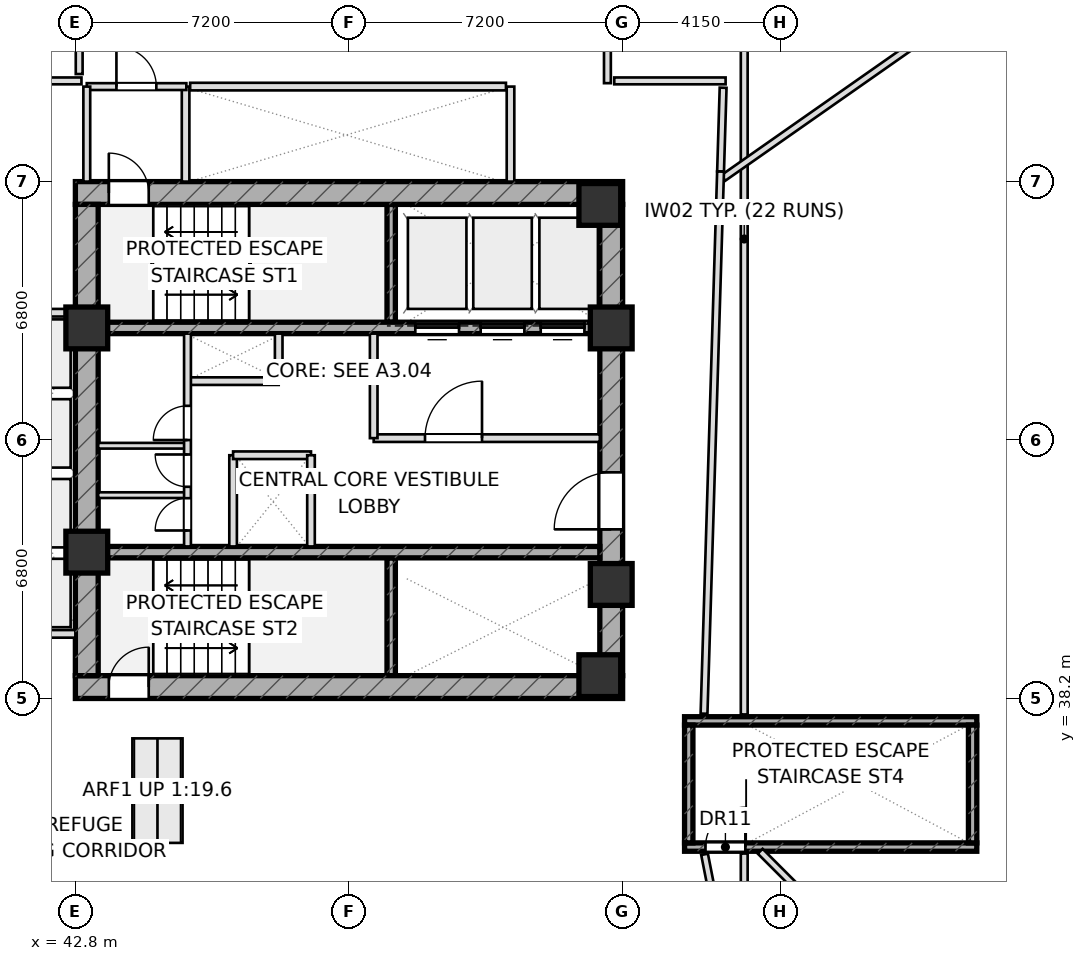
"""IFC4 building model, lengths in metres.
Left out: names, types, materials, properties, quantities, classifications, styles, units other than length and angle.
Written with IfcOpenShell. Run it as: python <this file> out.ifc"""

import sys

from ifc_helpers import new_model, si_unit, direction, frame, frame_2d, origin, origin_2d, place, context, subcontext, project, spatial, rectangle, extrude, element, fill, save


model = new_model("IFC4")
c1 = context("Model", 3, precision=1e-05, world=origin(), true_north=direction((0.0, 1.0)))
c2 = subcontext(c1, "Body", "Model", "MODEL_VIEW")
j1 = project(units=[si_unit("LENGTHUNIT", "METRE"), si_unit("PLANEANGLEUNIT", "RADIAN")], contexts=[c1])
p1 = place(None, origin())
s1 = spatial("IfcSite", under=j1, at=p1, CompositionType="ELEMENT")
p2 = place(p1, origin())
s2 = spatial("IfcBuilding", under=s1, at=p2, CompositionType="ELEMENT")
p3 = place(p2, frame((0.0, 0.0, 22.2)))
s3 = spatial("IfcBuildingStorey", under=s2, at=p3, CompositionType="ELEMENT", Elevation=22.2)
for number, where, z_axis, x_axis in (
    (1, (51.11, 48.1, 0.0), (0.0, 0.0, 1.0), (0.0, 1.0, 0.0)),
    (2, (51.11, 38.8, 0.0), (0.0, 0.0, 1.0), (0.0, 1.0, 0.0)),
):
    element("IfcWall", number, at=place(p3, frame(where, z_axis=z_axis, x_axis=x_axis)), inside=s3, PredefinedType="SHEAR", context=c2, shape_type="SweptSolid", body=[
        extrude(rectangle(XDim=3.1, YDim=0.22, at=frame_2d((1.55, 0.0))), origin(), (0.0, 0.0, 1.0), 5.1),
    ])
p4 = place(p3, frame((58.83, 34.29, 0.0), z_axis=(0.0, 0.0, 1.0), x_axis=(1.0, 0.0, 0.0)))
e3 = element("IfcWall", 3, at=p4, inside=s3, PredefinedType="SHEAR", context=c2, shape_type="SweptSolid", body=[
    extrude(rectangle(XDim=7.69, YDim=0.22, at=frame_2d((3.845, 0.0))), origin(), (0.0, 0.0, 1.0), 5.1),
])
p5 = place(p4, frame((0.55, 0.0, 0.0)))
e4 = element("IfcOpeningElement", 4, at=p5, cuts=e3, PredefinedType="OPENING", context=c2, shape_type="SweptSolid", body=[
    extrude(rectangle(XDim=1.05, YDim=2.2, at=frame_2d((0.525, 1.1))), frame((0.0, 0.12, 0.0), z_axis=(0.0, -1.0, 0.0), x_axis=(1.0, 0.0, 0.0)), (0.0, 0.0, 1.0), 0.24),
])
p6 = place(p3, frame((58.83, 37.61, 0.0), z_axis=(0.0, 0.0, 1.0), x_axis=(1.0, 0.0, 0.0)))
e5 = element("IfcWall", 5, at=p6, inside=s3, PredefinedType="SHEAR", context=c2, shape_type="SweptSolid", body=[
    extrude(rectangle(XDim=7.69, YDim=0.22, at=frame_2d((3.845, 0.0))), origin(), (0.0, 0.0, 1.0), 5.1),
])
for number, where, z_axis, x_axis in (
    (6, (66.41, 34.4, 0.0), (0.0, 0.0, 1.0), (0.0, 1.0, 0.0)),
    (7, (58.94, 34.4, 0.0), (0.0, 0.0, 1.0), (0.0, 1.0, 0.0)),
):
    element("IfcWall", number, at=place(p3, frame(where, z_axis=z_axis, x_axis=x_axis)), inside=s3, PredefinedType="SHEAR", context=c2, shape_type="SweptSolid", body=[
        extrude(rectangle(XDim=3.1, YDim=0.22, at=frame_2d((1.55, 0.0))), origin(), (0.0, 0.0, 1.0), 5.1),
    ])
p7 = place(p3, frame((42.8, 51.5, 0.0), z_axis=(0.0, 0.0, 1.0), x_axis=(1.0, 0.0, 0.0)))
e8 = element("IfcWall", 8, at=p7, inside=s3, PredefinedType="SHEAR", context=c2, shape_type="SweptSolid", body=[
    extrude(rectangle(XDim=14.4, YDim=0.6, at=frame_2d((7.2, 0.0))), origin(), (0.0, 0.0, 1.0), 5.1),
])
p8 = place(p7, frame((0.88, 0.0, 0.0)))
e9 = element("IfcOpeningElement", 9, at=p8, cuts=e8, PredefinedType="OPENING", context=c2, shape_type="SweptSolid", body=[
    extrude(rectangle(XDim=1.05, YDim=2.2, at=frame_2d((0.525, 1.1))), frame((0.0, 0.31, 0.0), z_axis=(0.0, -1.0, 0.0), x_axis=(1.0, 0.0, 0.0)), (0.0, 0.0, 1.0), 0.62),
])
p9 = place(p3, frame((42.8, 38.5, 0.0), z_axis=(0.0, 0.0, 1.0), x_axis=(1.0, 0.0, 0.0)))
e10 = element("IfcWall", 10, at=p9, inside=s3, PredefinedType="SHEAR", context=c2, shape_type="SweptSolid", body=[
    extrude(rectangle(XDim=14.4, YDim=0.6, at=frame_2d((7.2, 0.0))), origin(), (0.0, 0.0, 1.0), 5.1),
])
p10 = place(p9, frame((0.88, 0.0, 0.0)))
e11 = element("IfcOpeningElement", 11, at=p10, cuts=e10, PredefinedType="OPENING", context=c2, shape_type="SweptSolid", body=[
    extrude(rectangle(XDim=1.05, YDim=2.2, at=frame_2d((0.525, 1.1))), frame((0.0, 0.31, 0.0), z_axis=(0.0, -1.0, 0.0), x_axis=(1.0, 0.0, 0.0)), (0.0, 0.0, 1.0), 0.62),
])
p11 = place(p3, frame((43.1, 38.8, 0.0), z_axis=(0.0, 0.0, 1.0), x_axis=(0.0, 1.0, 0.0)))
e12 = element("IfcWall", 12, at=p11, inside=s3, PredefinedType="SHEAR", context=c2, shape_type="SweptSolid", body=[
    extrude(rectangle(XDim=12.4, YDim=0.6, at=frame_2d((6.2, 0.0))), origin(), (0.0, 0.0, 1.0), 5.1),
])
p12 = place(p3, frame((56.9, 38.8, 0.0), z_axis=(0.0, 0.0, 1.0), x_axis=(0.0, 1.0, 0.0)))
e13 = element("IfcWall", 13, at=p12, inside=s3, PredefinedType="SHEAR", context=c2, shape_type="SweptSolid", body=[
    extrude(rectangle(XDim=12.4, YDim=0.6, at=frame_2d((6.2, 0.0))), origin(), (0.0, 0.0, 1.0), 5.1),
])
p13 = place(p12, frame((3.85, 0.0, 0.0)))
e14 = element("IfcOpeningElement", 14, at=p13, cuts=e13, PredefinedType="OPENING", context=c2, shape_type="SweptSolid", body=[
    extrude(rectangle(XDim=1.5, YDim=2.2, at=frame_2d((0.75, 1.1))), frame((0.0, 0.31, 0.0), z_axis=(0.0, -1.0, 0.0), x_axis=(1.0, 0.0, 0.0)), (0.0, 0.0, 1.0), 0.62),
])
p14 = place(p3, frame((43.4, 47.95, 0.0), z_axis=(0.0, 0.0, 1.0), x_axis=(1.0, 0.0, 0.0)))
e15 = element("IfcWall", 15, at=p14, inside=s3, PredefinedType="SHEAR", context=c2, shape_type="SweptSolid", body=[
    extrude(rectangle(XDim=13.2, YDim=0.3, at=frame_2d((6.6, 0.0))), origin(), (0.0, 0.0, 1.0), 5.1),
])
p15 = place(p14, frame((8.345, 0.0, 0.0)))
e16 = element("IfcOpeningElement", 16, at=p15, cuts=e15, PredefinedType="OPENING", context=c2, shape_type="SweptSolid", body=[
    extrude(rectangle(XDim=1.15, YDim=2.2, at=frame_2d((0.575, 1.1))), frame((0.0, 0.16, 0.0), z_axis=(0.0, -1.0, 0.0), x_axis=(1.0, 0.0, 0.0)), (0.0, 0.0, 1.0), 0.32),
])
p16 = place(p14, frame((10.065, 0.0, 0.0)))
e17 = element("IfcOpeningElement", 17, at=p16, cuts=e15, PredefinedType="OPENING", context=c2, shape_type="SweptSolid", body=[
    extrude(rectangle(XDim=1.15, YDim=2.2, at=frame_2d((0.575, 1.1))), frame((0.0, 0.16, 0.0), z_axis=(0.0, -1.0, 0.0), x_axis=(1.0, 0.0, 0.0)), (0.0, 0.0, 1.0), 0.32),
])
p17 = place(p14, frame((11.645, 0.0, 0.0)))
e18 = element("IfcOpeningElement", 18, at=p17, cuts=e15, PredefinedType="OPENING", context=c2, shape_type="SweptSolid", body=[
    extrude(rectangle(XDim=1.15, YDim=2.2, at=frame_2d((0.575, 1.1))), frame((0.0, 0.16, 0.0), z_axis=(0.0, -1.0, 0.0), x_axis=(1.0, 0.0, 0.0)), (0.0, 0.0, 1.0), 0.32),
])
p18 = place(p3, frame((43.4, 42.05, 0.0), z_axis=(0.0, 0.0, 1.0), x_axis=(1.0, 0.0, 0.0)))
e19 = element("IfcWall", 19, at=p18, inside=s3, PredefinedType="SHEAR", context=c2, shape_type="SweptSolid", body=[
    extrude(rectangle(XDim=13.2, YDim=0.3, at=frame_2d((6.6, 0.0))), origin(), (0.0, 0.0, 1.0), 5.1),
])
for number, where, z_axis, x_axis in (
    (20, (43.1, 47.95, 0.0), (0.0, 0.0, 1.0), (1.0, 0.0, 0.0)),
    (21, (56.9, 47.95, 0.0), (0.0, 0.0, 1.0), (1.0, 0.0, 0.0)),
    (22, (56.6, 51.2, 0.0), (0.0, 0.0, 1.0), (1.0, 0.0, 0.0)),
    (23, (43.1, 42.05, 0.0), (0.0, 0.0, 1.0), (1.0, 0.0, 0.0)),
    (24, (56.9, 41.2, 0.0), (0.0, 0.0, 1.0), (1.0, 0.0, 0.0)),
    (25, (56.6, 38.8, 0.0), (0.0, 0.0, 1.0), (1.0, 0.0, 0.0)),
):
    element("IfcColumn", number, at=place(p3, frame(where, z_axis=z_axis, x_axis=x_axis)), inside=s3, PredefinedType="COLUMN", context=c2, shape_type="SweptSolid", body=[
        extrude(rectangle(XDim=1.1, YDim=1.1, at=origin_2d()), origin(), (0.0, 0.0, 1.0), 5.1),
    ])
for number, where, z_axis, x_axis in (
    (26, (40.3, 39.9, 0.0), (0.0, 0.0, 1.0), (1.0, 0.0, 0.0)),
    (27, (40.3, 48.35, 0.0), (0.0, 0.0, 1.0), (1.0, 0.0, 0.0)),
    (28, (45.7, 51.8, 0.0), (0.0, 0.0, 1.0), (0.0, 1.0, 0.0)),
    (29, (54.25, 51.8, 0.0), (0.0, 0.0, 1.0), (0.0, 1.0, 0.0)),
):
    element("IfcWall", number, at=place(p3, frame(where, z_axis=z_axis, x_axis=x_axis)), inside=s3, PredefinedType="PARTITIONING", context=c2, shape_type="SweptSolid", body=[
        extrude(rectangle(XDim=2.5, YDim=0.2, at=frame_2d((1.25, 0.0))), origin(), (0.0, 0.0, 1.0), 5.1),
    ])
p19 = place(p3, frame((45.75, 46.55, 0.0), z_axis=(0.0, 0.0, 1.0), x_axis=(1.0, 0.0, 0.0)))
e30 = element("IfcWall", 30, at=p19, inside=s3, PredefinedType="PARTITIONING", context=c2, shape_type="SweptSolid", body=[
    extrude(rectangle(XDim=2.4, YDim=0.2, at=frame_2d((1.2, 0.0))), origin(), (0.0, 0.0, 1.0), 5.1),
])
p20 = place(p3, frame((48.15, 46.55, 0.0), z_axis=(0.0, 0.0, 1.0), x_axis=(0.0, 1.0, 0.0)))
e31 = element("IfcWall", 31, at=p20, inside=s3, PredefinedType="PARTITIONING", context=c2, shape_type="SweptSolid", body=[
    extrude(rectangle(XDim=1.25, YDim=0.2, at=frame_2d((0.625, 0.0))), origin(), (0.0, 0.0, 1.0), 5.1),
])
p21 = place(p3, frame((46.95, 42.2, 0.0), z_axis=(0.0, 0.0, 1.0), x_axis=(0.0, 1.0, 0.0)))
e32 = element("IfcWall", 32, at=p21, inside=s3, PredefinedType="PARTITIONING", context=c2, shape_type="SweptSolid", body=[
    extrude(rectangle(XDim=2.4, YDim=0.2, at=frame_2d((1.2, 0.0))), origin(), (0.0, 0.0, 1.0), 5.1),
])
p22 = place(p3, frame((46.95, 44.6, 0.0), z_axis=(0.0, 0.0, 1.0), x_axis=(1.0, 0.0, 0.0)))
e33 = element("IfcWall", 33, at=p22, inside=s3, PredefinedType="PARTITIONING", context=c2, shape_type="SweptSolid", body=[
    extrude(rectangle(XDim=2.05, YDim=0.2, at=frame_2d((1.025, 0.0))), origin(), (0.0, 0.0, 1.0), 5.1),
])
p23 = place(p3, frame((50.65, 45.05, 0.0), z_axis=(0.0, 0.0, 1.0), x_axis=(1.0, 0.0, 0.0)))
e34 = element("IfcWall", 34, at=p23, inside=s3, PredefinedType="PARTITIONING", context=c2, shape_type="SweptSolid", body=[
    extrude(rectangle(XDim=5.95, YDim=0.2, at=frame_2d((2.975, 0.0))), origin(), (0.0, 0.0, 1.0), 5.1),
])
p24 = place(p23, frame((1.35, 0.0, 0.0)))
e35 = element("IfcOpeningElement", 35, at=p24, cuts=e34, PredefinedType="OPENING", context=c2, shape_type="SweptSolid", body=[
    extrude(rectangle(XDim=1.5, YDim=2.2, at=frame_2d((0.75, 1.1))), frame((0.0, 0.11, 0.0), z_axis=(0.0, -1.0, 0.0), x_axis=(1.0, 0.0, 0.0)), (0.0, 0.0, 1.0), 0.22),
])
p25 = place(p3, frame((50.65, 45.05, 0.0), z_axis=(0.0, 0.0, 1.0), x_axis=(0.0, 1.0, 0.0)))
e36 = element("IfcWall", 36, at=p25, inside=s3, PredefinedType="PARTITIONING", context=c2, shape_type="SweptSolid", body=[
    extrude(rectangle(XDim=2.75, YDim=0.2, at=frame_2d((1.375, 0.0))), origin(), (0.0, 0.0, 1.0), 5.1),
])
for number, where, z_axis, x_axis in (
    (37, (43.4, 43.55, 0.0), (0.0, 0.0, 1.0), (1.0, 0.0, 0.0)),
    (38, (43.4, 44.85, 0.0), (0.0, 0.0, 1.0), (1.0, 0.0, 0.0)),
):
    element("IfcWall", number, at=place(p3, frame(where, z_axis=z_axis, x_axis=x_axis)), inside=s3, PredefinedType="PARTITIONING", context=c2, shape_type="SweptSolid", body=[
        extrude(rectangle(XDim=2.35, YDim=0.15, at=frame_2d((1.175, 0.0))), origin(), (0.0, 0.0, 1.0), 5.1),
    ])
p26 = place(p3, frame((45.75, 42.2, 0.0), z_axis=(0.0, 0.0, 1.0), x_axis=(0.0, 1.0, 0.0)))
e39 = element("IfcWall", 39, at=p26, inside=s3, PredefinedType="PARTITIONING", context=c2, shape_type="SweptSolid", body=[
    extrude(rectangle(XDim=5.6, YDim=0.18, at=frame_2d((2.8, 0.0))), origin(), (0.0, 0.0, 1.0), 5.1),
])
p27 = place(p26, frame((0.42, 0.0, 0.0)))
e40 = element("IfcOpeningElement", 40, at=p27, cuts=e39, PredefinedType="OPENING", context=c2, shape_type="SweptSolid", body=[
    extrude(rectangle(XDim=0.85, YDim=2.05, at=frame_2d((0.425, 1.025))), frame((0.0, 0.1, 0.0), z_axis=(0.0, -1.0, 0.0), x_axis=(1.0, 0.0, 0.0)), (0.0, 0.0, 1.0), 0.2),
])
p28 = place(p26, frame((1.57, 0.0, 0.0)))
e41 = element("IfcOpeningElement", 41, at=p28, cuts=e39, PredefinedType="OPENING", context=c2, shape_type="SweptSolid", body=[
    extrude(rectangle(XDim=0.85, YDim=2.05, at=frame_2d((0.425, 1.025))), frame((0.0, 0.1, 0.0), z_axis=(0.0, -1.0, 0.0), x_axis=(1.0, 0.0, 0.0)), (0.0, 0.0, 1.0), 0.2),
])
p29 = place(p26, frame((2.8, 0.0, 0.0)))
e42 = element("IfcOpeningElement", 42, at=p29, cuts=e39, PredefinedType="OPENING", context=c2, shape_type="SweptSolid", body=[
    extrude(rectangle(XDim=0.9, YDim=2.05, at=frame_2d((0.45, 1.025))), frame((0.0, 0.1, 0.0), z_axis=(0.0, -1.0, 0.0), x_axis=(1.0, 0.0, 0.0)), (0.0, 0.0, 1.0), 0.2),
])
p30 = place(p3, frame((60.4, 27.2, 0.0), z_axis=(0.0, 0.0, 1.0), x_axis=(0.0, 1.0, 0.0)))
e43 = element("IfcWall", 43, at=p30, inside=s3, PredefinedType="PARTITIONING", context=c2, shape_type="SweptSolid", body=[
    extrude(rectangle(XDim=6.92, YDim=0.18, at=frame_2d((3.46, 0.0))), origin(), (0.0, 0.0, 1.0), 2.575),
])
p31 = place(p3, frame((60.4, 37.78, 0.0), z_axis=(0.0, 0.0, 1.0), x_axis=(0.0, 1.0, 0.0)))
e44 = element("IfcWall", 44, at=p31, inside=s3, PredefinedType="PARTITIONING", context=c2, shape_type="SweptSolid", body=[
    extrude(rectangle(XDim=25.02, YDim=0.18, at=frame_2d((12.51, 0.0))), origin(), (0.0, 0.0, 1.0), 2.575),
])
p32 = place(p3, frame((43.1, 54.3, 0.0), z_axis=(0.0, 0.0, 1.0), x_axis=(1.0, 0.0, 0.0)))
e45 = element("IfcWall", 45, at=p32, inside=s3, PredefinedType="PARTITIONING", context=c2, shape_type="SweptSolid", body=[
    extrude(rectangle(XDim=2.62, YDim=0.18, at=frame_2d((1.31, 0.0))), origin(), (0.0, 0.0, 1.0), 5.1),
])
p33 = place(p32, frame((0.78, 0.0, 0.0)))
e46 = element("IfcOpeningElement", 46, at=p33, cuts=e45, PredefinedType="OPENING", context=c2, shape_type="SweptSolid", body=[
    extrude(rectangle(XDim=1.05, YDim=2.2, at=frame_2d((0.525, 1.1))), frame((0.0, 0.1, 0.0), z_axis=(0.0, -1.0, 0.0), x_axis=(1.0, 0.0, 0.0)), (0.0, 0.0, 1.0), 0.2),
])
p34 = place(p3, frame((43.1, 51.8, 0.0), z_axis=(0.0, 0.0, 1.0), x_axis=(0.0, 1.0, 0.0)))
e47 = element("IfcWall", 47, at=p34, inside=s3, PredefinedType="PARTITIONING", context=c2, shape_type="SweptSolid", body=[
    extrude(rectangle(XDim=2.5, YDim=0.18, at=frame_2d((1.25, 0.0))), origin(), (0.0, 0.0, 1.0), 5.1),
])
p35 = place(p3, frame((59.85, 51.897, 0.0), z_axis=(0.0, 0.0, 1.0), x_axis=(0.819143359288, 0.573588839619, 0.0)))
e48 = element("IfcWall", 48, at=p35, inside=s3, PredefinedType="PARTITIONING", context=c2, shape_type="SweptSolid", body=[
    extrude(rectangle(XDim=11.269, YDim=0.18, at=frame_2d((5.634, 0.0))), origin(), (0.0, 0.0, 1.0), 2.575),
])
p36 = place(p3, frame((60.82, 34.18, 0.0), z_axis=(0.0, 0.0, 1.0), x_axis=(0.707106781187, -0.707106781187, 0.0)))
e49 = element("IfcWall", 49, at=p36, inside=s3, PredefinedType="PARTITIONING", context=c2, shape_type="SweptSolid", body=[
    extrude(rectangle(XDim=13.583, YDim=0.18, at=frame_2d((6.792, 0.0))), origin(), (0.0, 0.0, 1.0), 2.575),
])
p37 = place(p3, frame((40.33, 54.45, 0.0), z_axis=(0.0, 0.0, 1.0), x_axis=(1.0, 0.0, 0.0)))
e50 = element("IfcWall", 50, at=p37, inside=s3, PredefinedType="PARTITIONING", context=c2, shape_type="SweptSolid", body=[
    extrude(rectangle(XDim=2.63, YDim=0.18, at=frame_2d((1.315, 0.0))), origin(), (0.0, 0.0, 1.0), 5.1),
])
for number, where, z_axis, x_axis in (
    (51, (42.9, 54.63, 0.0), (0.0, 0.0, 1.0), (0.0, 1.0, 0.0)),
    (52, (56.8, 56.92, 0.0), (0.0, 0.0, 1.0), (0.0, -1.0, 0.0)),
):
    element("IfcWall", number, at=place(p3, frame(where, z_axis=z_axis, x_axis=x_axis)), inside=s3, PredefinedType="PARTITIONING", context=c2, shape_type="SweptSolid", body=[
        extrude(rectangle(XDim=2.53, YDim=0.18, at=frame_2d((1.265, 0.0))), origin(), (0.0, 0.0, 1.0), 2.575),
    ])
p38 = place(p3, frame((56.98, 54.45, 0.0), z_axis=(0.0, 0.0, 1.0), x_axis=(1.0, 0.0, 0.0)))
e53 = element("IfcWall", 53, at=p38, inside=s3, PredefinedType="PARTITIONING", context=c2, shape_type="SweptSolid", body=[
    extrude(rectangle(XDim=2.93, YDim=0.18, at=frame_2d((1.465, 0.0))), origin(), (0.0, 0.0, 1.0), 2.575),
])
p39 = place(p3, frame((59.844, 54.27, 0.0), z_axis=(0.0, 0.0, 1.0), x_axis=(-0.030477021135, -0.999535467696, 0.0)))
e54 = element("IfcWall", 54, at=p39, inside=s3, PredefinedType="PARTITIONING", context=c2, shape_type="SweptSolid", body=[
    extrude(rectangle(XDim=2.203, YDim=0.18, at=frame_2d((1.102, 0.0))), origin(), (0.0, 0.0, 1.0), 5.1),
])
p40 = place(p3, frame((59.777, 52.063, 0.0), z_axis=(0.0, 0.0, 1.0), x_axis=(-0.030470414506, -0.999535669118, 0.0)))
e55 = element("IfcWall", 55, at=p40, inside=s3, PredefinedType="PARTITIONING", context=c2, shape_type="SweptSolid", body=[
    extrude(rectangle(XDim=14.27, YDim=0.18, at=frame_2d((7.135, 0.0))), origin(), (0.0, 0.0, 1.0), 5.1),
])
p41 = place(p3, frame((59.356, 34.099, 0.0), z_axis=(0.0, 0.0, 1.0), x_axis=(0.193918813567, -0.981017580752, 0.0)))
e56 = element("IfcWall", 56, at=p41, inside=s3, PredefinedType="PARTITIONING", context=c2, shape_type="SweptSolid", body=[
    extrude(rectangle(XDim=2.607, YDim=0.18, at=frame_2d((1.304, 0.0))), origin(), (0.0, 0.0, 1.0), 2.575),
])
p42 = place(p3, frame((49.0, 42.2, 0.0), z_axis=(0.0, 0.0, 1.0), x_axis=(0.0, 1.0, 0.0)))
e57 = element("IfcWall", 57, at=p42, inside=s3, PredefinedType="PARTITIONING", context=c2, shape_type="SweptSolid", body=[
    extrude(rectangle(XDim=2.4, YDim=0.2, at=frame_2d((1.2, 0.0))), origin(), (0.0, 0.0, 1.0), 5.1),
])
p43 = place(p3, frame((45.82, 54.3, 0.0), z_axis=(0.0, 0.0, 1.0), x_axis=(1.0, 0.0, 0.0)))
e58 = element("IfcWall", 58, at=p43, inside=s3, PredefinedType="PARTITIONING", context=c2, shape_type="SweptSolid", body=[
    extrude(rectangle(XDim=8.31, YDim=0.2, at=frame_2d((4.155, 0.0))), origin(), (0.0, 0.0, 1.0), 5.1),
])
p44 = place(p8, origin())
e59 = element("IfcDoor", 59, at=p44, inside=s3, OperationType="SINGLE_SWING_LEFT", PredefinedType="DOOR", context=c2, shape_type="SweptSolid", body=[
    extrude(rectangle(XDim=1.05, YDim=2.2, at=frame_2d((0.525, 1.1))), frame((0.0, 0.025, 0.0), z_axis=(0.0, -1.0, 0.0), x_axis=(1.0, 0.0, 0.0)), (0.0, 0.0, 1.0), 0.05),
])
fill(e9, e59)
p45 = place(p10, origin())
e60 = element("IfcDoor", 60, at=p45, inside=s3, OperationType="SINGLE_SWING_RIGHT", PredefinedType="DOOR", context=c2, shape_type="SweptSolid", body=[
    extrude(rectangle(XDim=1.05, YDim=2.2, at=frame_2d((0.525, 1.1))), frame((0.0, 0.025, 0.0), z_axis=(0.0, -1.0, 0.0), x_axis=(1.0, 0.0, 0.0)), (0.0, 0.0, 1.0), 0.05),
])
fill(e11, e60)
p46 = place(p13, origin())
e61 = element("IfcDoor", 61, at=p46, inside=s3, OperationType="SINGLE_SWING_LEFT", PredefinedType="DOOR", context=c2, shape_type="SweptSolid", body=[
    extrude(rectangle(XDim=1.5, YDim=2.2, at=frame_2d((0.75, 1.1))), frame((0.0, 0.025, 0.0), z_axis=(0.0, -1.0, 0.0), x_axis=(1.0, 0.0, 0.0)), (0.0, 0.0, 1.0), 0.05),
])
fill(e14, e61)
p47 = place(p24, origin())
e62 = element("IfcDoor", 62, at=p47, inside=s3, OperationType="SINGLE_SWING_RIGHT", PredefinedType="DOOR", context=c2, shape_type="SweptSolid", body=[
    extrude(rectangle(XDim=1.5, YDim=2.2, at=frame_2d((0.75, 1.1))), frame((0.0, 0.025, 0.0), z_axis=(0.0, -1.0, 0.0), x_axis=(1.0, 0.0, 0.0)), (0.0, 0.0, 1.0), 0.05),
])
fill(e35, e62)
p48 = place(p5, origin())
e63 = element("IfcDoor", 63, at=p48, inside=s3, OperationType="SINGLE_SWING_RIGHT", PredefinedType="DOOR", context=c2, shape_type="SweptSolid", body=[
    extrude(rectangle(XDim=1.05, YDim=2.2, at=frame_2d((0.525, 1.1))), frame((0.0, 0.025, 0.0), z_axis=(0.0, -1.0, 0.0), x_axis=(1.0, 0.0, 0.0)), (0.0, 0.0, 1.0), 0.05),
])
fill(e4, e63)
p49 = place(p27, origin())
e64 = element("IfcDoor", 64, at=p49, inside=s3, OperationType="SINGLE_SWING_LEFT", PredefinedType="DOOR", context=c2, shape_type="SweptSolid", body=[
    extrude(rectangle(XDim=0.85, YDim=2.05, at=frame_2d((0.425, 1.025))), frame((0.0, 0.025, 0.0), z_axis=(0.0, -1.0, 0.0), x_axis=(1.0, 0.0, 0.0)), (0.0, 0.0, 1.0), 0.05),
])
fill(e40, e64)
p50 = place(p28, origin())
e65 = element("IfcDoor", 65, at=p50, inside=s3, OperationType="SINGLE_SWING_RIGHT", PredefinedType="DOOR", context=c2, shape_type="SweptSolid", body=[
    extrude(rectangle(XDim=0.85, YDim=2.05, at=frame_2d((0.425, 1.025))), frame((0.0, 0.025, 0.0), z_axis=(0.0, -1.0, 0.0), x_axis=(1.0, 0.0, 0.0)), (0.0, 0.0, 1.0), 0.05),
])
fill(e41, e65)
p51 = place(p29, origin())
e66 = element("IfcDoor", 66, at=p51, inside=s3, OperationType="SINGLE_SWING_LEFT", PredefinedType="DOOR", context=c2, shape_type="SweptSolid", body=[
    extrude(rectangle(XDim=0.9, YDim=2.05, at=frame_2d((0.45, 1.025))), frame((0.0, 0.025, 0.0), z_axis=(0.0, -1.0, 0.0), x_axis=(1.0, 0.0, 0.0)), (0.0, 0.0, 1.0), 0.05),
])
fill(e42, e66)
p52 = place(p33, origin())
e67 = element("IfcDoor", 67, at=p52, inside=s3, OperationType="SINGLE_SWING_LEFT", PredefinedType="DOOR", context=c2, shape_type="SweptSolid", body=[
    extrude(rectangle(XDim=1.05, YDim=2.2, at=frame_2d((0.525, 1.1))), frame((0.0, 0.025, 0.0), z_axis=(0.0, -1.0, 0.0), x_axis=(1.0, 0.0, 0.0)), (0.0, 0.0, 1.0), 0.05),
])
fill(e46, e67)
p53 = place(p15, origin())
e68 = element("IfcDoor", 68, at=p53, inside=s3, OperationType="SLIDING_TO_LEFT", PredefinedType="DOOR", context=c2, shape_type="SweptSolid", body=[
    extrude(rectangle(XDim=1.15, YDim=2.2, at=frame_2d((0.575, 1.1))), frame((0.0, 0.025, 0.0), z_axis=(0.0, -1.0, 0.0), x_axis=(1.0, 0.0, 0.0)), (0.0, 0.0, 1.0), 0.05),
])
fill(e16, e68)
p54 = place(p16, origin())
e69 = element("IfcDoor", 69, at=p54, inside=s3, OperationType="SLIDING_TO_LEFT", PredefinedType="DOOR", context=c2, shape_type="SweptSolid", body=[
    extrude(rectangle(XDim=1.15, YDim=2.2, at=frame_2d((0.575, 1.1))), frame((0.0, 0.025, 0.0), z_axis=(0.0, -1.0, 0.0), x_axis=(1.0, 0.0, 0.0)), (0.0, 0.0, 1.0), 0.05),
])
fill(e17, e69)
p55 = place(p17, origin())
e70 = element("IfcDoor", 70, at=p55, inside=s3, OperationType="SLIDING_TO_LEFT", PredefinedType="DOOR", context=c2, shape_type="SweptSolid", body=[
    extrude(rectangle(XDim=1.15, YDim=2.2, at=frame_2d((0.575, 1.1))), frame((0.0, 0.025, 0.0), z_axis=(0.0, -1.0, 0.0), x_axis=(1.0, 0.0, 0.0)), (0.0, 0.0, 1.0), 0.05),
])
fill(e18, e70)
save(model, sys.argv[1])
